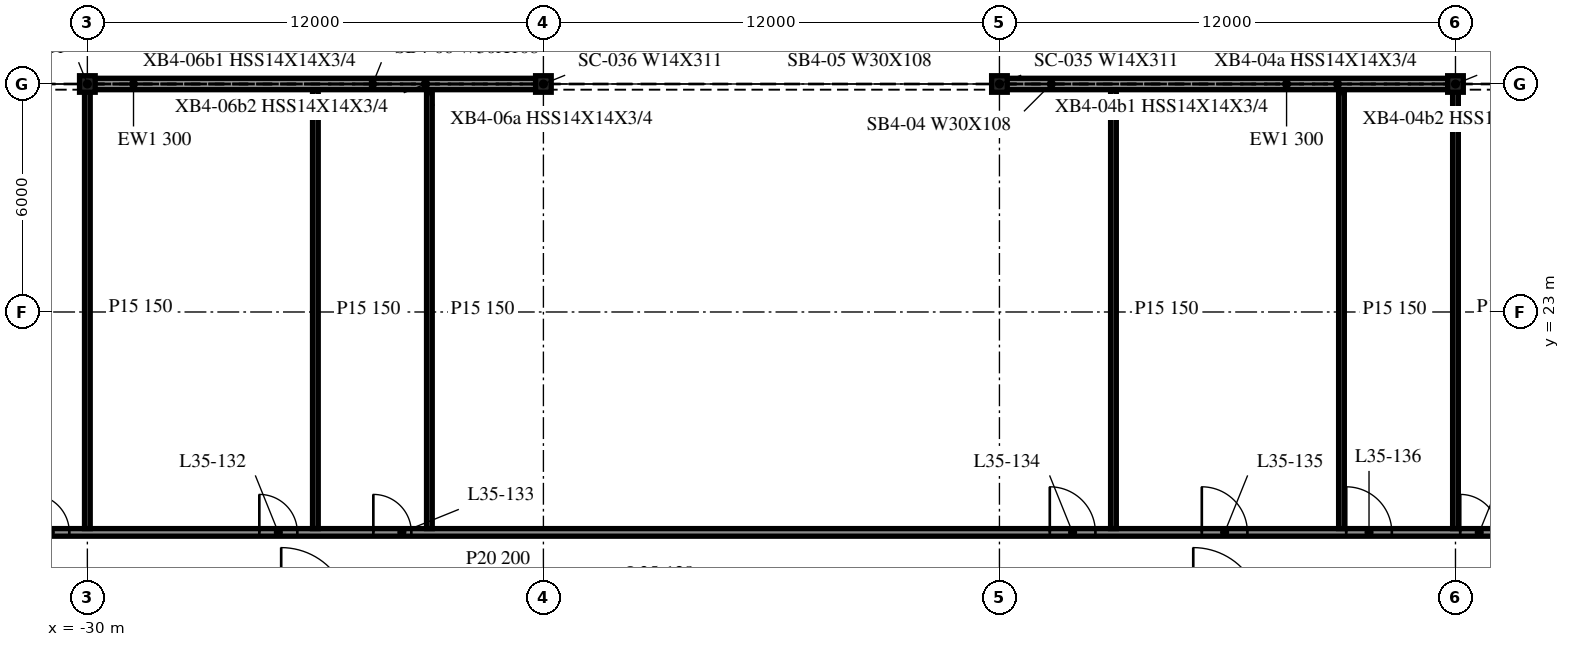
"""IFC4 building model, lengths in metres.
Left out: names, types, materials, properties, quantities, classifications, styles, units other than length and angle.
Written with IfcOpenShell. Run it as: python <this file> out.ifc"""

import sys

from ifc_helpers import new_model, si_unit, direction, frame, frame_2d, origin, origin_2d, place, context, subcontext, project, spatial, rectangle, i_section, extrude, element, fill, save


model = new_model("IFC4")
c1 = context("Model", 3, precision=1e-05, world=origin(), true_north=direction((0.0, 1.0)))
c2 = subcontext(c1, "Body", "Model", "MODEL_VIEW")
j1 = project(units=[si_unit("LENGTHUNIT", "METRE"), si_unit("PLANEANGLEUNIT", "RADIAN")], contexts=[c1])
p1 = place(None, origin())
s1 = spatial("IfcSite", under=j1, at=p1, CompositionType="ELEMENT")
p2 = place(p1, origin())
s2 = spatial("IfcBuilding", under=s1, at=p2, CompositionType="ELEMENT")
p3 = place(p2, frame((0.0, 0.0, 150.7)))
s3 = spatial("IfcBuildingStorey", under=s2, at=p3, CompositionType="ELEMENT", Elevation=150.7)
for number, where, z_axis, x_axis in (
    (1, (6.0, 29.0, -0.34), (0.0, 0.0, 1.0), (1.0, 0.0, 0.0)),
    (2, (-6.0, 29.0, -0.34), (0.0, 0.0, 1.0), (1.0, 0.0, 0.0)),
    (3, (-18.0, 29.0, -0.34), (0.0, 0.0, 1.0), (1.0, 0.0, 0.0)),
    (4, (-30.0, 29.0, -0.34), (0.0, 0.0, 1.0), (1.0, 0.0, 0.0)),
):
    element("IfcColumn", number, at=place(p3, frame(where, z_axis=z_axis, x_axis=x_axis)), inside=s3, PredefinedType="COLUMN", context=c2, shape_type="SweptSolid", body=[
        extrude(i_section(OverallWidth=0.412, OverallDepth=0.434, WebThickness=0.036, FlangeThickness=0.057, at=origin_2d()), origin(), (0.0, 0.0, 1.0), 3.89),
    ])
for number, where, z_axis, x_axis in (
    (5, (5.982, 29.0, 0.0), (0.0, 0.0, 1.0), (-1.0, 0.0, 0.0)),
    (6, (-18.018, 29.0, 0.0), (0.0, 0.0, 1.0), (-1.0, 0.0, 0.0)),
):
    element("IfcWall", number, at=place(p3, frame(where, z_axis=z_axis, x_axis=x_axis)), inside=s3, PredefinedType="NOTDEFINED", context=c2, shape_type="SweptSolid", body=[
        extrude(rectangle(XDim=11.964, YDim=0.3, at=frame_2d((5.982, 0.0))), origin(), (0.0, 0.0, 1.0), 3.55),
    ])
p4 = place(p3, frame((-47.975, 17.2, 0.0), z_axis=(0.0, 0.0, 1.0), x_axis=(1.0, 0.0, 0.0)))
e7 = element("IfcWall", 7, at=p4, inside=s3, PredefinedType="PARTITIONING", context=c2, shape_type="SweptSolid", body=[
    extrude(rectangle(XDim=95.95, YDim=0.2, at=frame_2d((47.975, 0.0))), origin(), (0.0, 0.0, 1.0), 3.55),
])
p5 = place(p4, frame((16.5, 0.0, 0.0)))
e8 = element("IfcOpeningElement", 8, at=p5, cuts=e7, PredefinedType="OPENING", context=c2, shape_type="SweptSolid", body=[
    extrude(rectangle(XDim=1.0, YDim=2.1, at=frame_2d((0.5, 1.05))), frame((0.0, 0.11, 0.0), z_axis=(0.0, -1.0, 0.0), x_axis=(1.0, 0.0, 0.0)), (0.0, 0.0, 1.0), 0.22),
])
p6 = place(p4, frame((22.5, 0.0, 0.0)))
e9 = element("IfcOpeningElement", 9, at=p6, cuts=e7, PredefinedType="OPENING", context=c2, shape_type="SweptSolid", body=[
    extrude(rectangle(XDim=1.0, YDim=2.1, at=frame_2d((0.5, 1.05))), frame((0.0, 0.11, 0.0), z_axis=(0.0, -1.0, 0.0), x_axis=(1.0, 0.0, 0.0)), (0.0, 0.0, 1.0), 0.22),
])
p7 = place(p4, frame((25.5, 0.0, 0.0)))
e10 = element("IfcOpeningElement", 10, at=p7, cuts=e7, PredefinedType="OPENING", context=c2, shape_type="SweptSolid", body=[
    extrude(rectangle(XDim=1.0, YDim=2.1, at=frame_2d((0.5, 1.05))), frame((0.0, 0.11, 0.0), z_axis=(0.0, -1.0, 0.0), x_axis=(1.0, 0.0, 0.0)), (0.0, 0.0, 1.0), 0.22),
])
p8 = place(p4, frame((43.3, 0.0, 0.0)))
e11 = element("IfcOpeningElement", 11, at=p8, cuts=e7, PredefinedType="OPENING", context=c2, shape_type="SweptSolid", body=[
    extrude(rectangle(XDim=1.2, YDim=2.1, at=frame_2d((0.6, 1.05))), frame((0.0, 0.11, 0.0), z_axis=(0.0, -1.0, 0.0), x_axis=(1.0, 0.0, 0.0)), (0.0, 0.0, 1.0), 0.22),
])
p9 = place(p4, frame((47.3, 0.0, 0.0)))
e12 = element("IfcOpeningElement", 12, at=p9, cuts=e7, PredefinedType="OPENING", context=c2, shape_type="SweptSolid", body=[
    extrude(rectangle(XDim=1.2, YDim=2.1, at=frame_2d((0.6, 1.05))), frame((0.0, 0.11, 0.0), z_axis=(0.0, -1.0, 0.0), x_axis=(1.0, 0.0, 0.0)), (0.0, 0.0, 1.0), 0.22),
])
p10 = place(p4, frame((51.1, 0.0, 0.0)))
e13 = element("IfcOpeningElement", 13, at=p10, cuts=e7, PredefinedType="OPENING", context=c2, shape_type="SweptSolid", body=[
    extrude(rectangle(XDim=1.2, YDim=2.1, at=frame_2d((0.6, 1.05))), frame((0.0, 0.11, 0.0), z_axis=(0.0, -1.0, 0.0), x_axis=(1.0, 0.0, 0.0)), (0.0, 0.0, 1.0), 0.22),
])
p11 = place(p4, frame((54.1, 0.0, 0.0)))
e14 = element("IfcOpeningElement", 14, at=p11, cuts=e7, PredefinedType="OPENING", context=c2, shape_type="SweptSolid", body=[
    extrude(rectangle(XDim=1.0, YDim=2.1, at=frame_2d((0.5, 1.05))), frame((0.0, 0.11, 0.0), z_axis=(0.0, -1.0, 0.0), x_axis=(1.0, 0.0, 0.0)), (0.0, 0.0, 1.0), 0.22),
])
p12 = place(p4, frame((72.1, 0.0, 0.0)))
e15 = element("IfcOpeningElement", 15, at=p12, cuts=e7, PredefinedType="OPENING", context=c2, shape_type="SweptSolid", body=[
    extrude(rectangle(XDim=1.0, YDim=2.1, at=frame_2d((0.5, 1.05))), frame((0.0, 0.11, 0.0), z_axis=(0.0, -1.0, 0.0), x_axis=(1.0, 0.0, 0.0)), (0.0, 0.0, 1.0), 0.22),
])
p13 = place(p4, frame((78.1, 0.0, 0.0)))
e16 = element("IfcOpeningElement", 16, at=p13, cuts=e7, PredefinedType="OPENING", context=c2, shape_type="SweptSolid", body=[
    extrude(rectangle(XDim=1.0, YDim=2.1, at=frame_2d((0.5, 1.05))), frame((0.0, 0.11, 0.0), z_axis=(0.0, -1.0, 0.0), x_axis=(1.0, 0.0, 0.0)), (0.0, 0.0, 1.0), 0.22),
])
p14 = place(p4, frame((81.1, 0.0, 0.0)))
e17 = element("IfcOpeningElement", 17, at=p14, cuts=e7, PredefinedType="OPENING", context=c2, shape_type="SweptSolid", body=[
    extrude(rectangle(XDim=1.2, YDim=2.1, at=frame_2d((0.6, 1.05))), frame((0.0, 0.11, 0.0), z_axis=(0.0, -1.0, 0.0), x_axis=(1.0, 0.0, 0.0)), (0.0, 0.0, 1.0), 0.22),
])
p15 = place(p3, frame((-30.0, 17.3, 0.0), z_axis=(0.0, 0.0, 1.0), x_axis=(0.0, 1.0, 0.0)))
e18 = element("IfcWall", 18, at=p15, inside=s3, PredefinedType="PARTITIONING", context=c2, shape_type="SweptSolid", body=[
    extrude(rectangle(XDim=11.675, YDim=0.15, at=frame_2d((5.837, 0.0))), origin(), (0.0, 0.0, 1.0), 2.551),
])
for number, where, z_axis, x_axis in (
    (19, (-24.0, 17.3, 0.0), (0.0, 0.0, 1.0), (0.0, 1.0, 0.0)),
    (20, (-21.0, 17.3, 0.0), (0.0, 0.0, 1.0), (0.0, 1.0, 0.0)),
    (21, (-3.0, 17.3, 0.0), (0.0, 0.0, 1.0), (0.0, 1.0, 0.0)),
    (22, (3.0, 17.3, 0.0), (0.0, 0.0, 1.0), (0.0, 1.0, 0.0)),
):
    element("IfcWall", number, at=place(p3, frame(where, z_axis=z_axis, x_axis=x_axis)), inside=s3, PredefinedType="PARTITIONING", context=c2, shape_type="SweptSolid", body=[
        extrude(rectangle(XDim=11.55, YDim=0.15, at=frame_2d((5.775, 0.0))), origin(), (0.0, 0.0, 1.0), 3.55),
    ])
p16 = place(p3, frame((6.0, 17.3, 0.0), z_axis=(0.0, 0.0, 1.0), x_axis=(0.0, 1.0, 0.0)))
e23 = element("IfcWall", 23, at=p16, inside=s3, PredefinedType="PARTITIONING", context=c2, shape_type="SweptSolid", body=[
    extrude(rectangle(XDim=11.675, YDim=0.15, at=frame_2d((5.837, 0.0))), origin(), (0.0, 0.0, 1.0), 2.551),
])
p17 = place(p5, origin())
e24 = element("IfcDoor", 24, at=p17, inside=s3, OperationType="SINGLE_SWING_LEFT", PredefinedType="DOOR", context=c2, shape_type="SweptSolid", body=[
    extrude(rectangle(XDim=1.0, YDim=2.1, at=frame_2d((0.5, 1.05))), frame((0.0, 0.025, 0.0), z_axis=(0.0, -1.0, 0.0), x_axis=(1.0, 0.0, 0.0)), (0.0, 0.0, 1.0), 0.05),
])
fill(e8, e24)
p18 = place(p6, origin())
e25 = element("IfcDoor", 25, at=p18, inside=s3, OperationType="SINGLE_SWING_LEFT", PredefinedType="DOOR", context=c2, shape_type="SweptSolid", body=[
    extrude(rectangle(XDim=1.0, YDim=2.1, at=frame_2d((0.5, 1.05))), frame((0.0, 0.025, 0.0), z_axis=(0.0, -1.0, 0.0), x_axis=(1.0, 0.0, 0.0)), (0.0, 0.0, 1.0), 0.05),
])
fill(e9, e25)
p19 = place(p7, origin())
e26 = element("IfcDoor", 26, at=p19, inside=s3, OperationType="SINGLE_SWING_LEFT", PredefinedType="DOOR", context=c2, shape_type="SweptSolid", body=[
    extrude(rectangle(XDim=1.0, YDim=2.1, at=frame_2d((0.5, 1.05))), frame((0.0, 0.025, 0.0), z_axis=(0.0, -1.0, 0.0), x_axis=(1.0, 0.0, 0.0)), (0.0, 0.0, 1.0), 0.05),
])
fill(e10, e26)
p20 = place(p8, origin())
e27 = element("IfcDoor", 27, at=p20, inside=s3, OperationType="SINGLE_SWING_LEFT", PredefinedType="DOOR", context=c2, shape_type="SweptSolid", body=[
    extrude(rectangle(XDim=1.2, YDim=2.1, at=frame_2d((0.6, 1.05))), frame((0.0, 0.025, 0.0), z_axis=(0.0, -1.0, 0.0), x_axis=(1.0, 0.0, 0.0)), (0.0, 0.0, 1.0), 0.05),
])
fill(e11, e27)
p21 = place(p9, origin())
e28 = element("IfcDoor", 28, at=p21, inside=s3, OperationType="SINGLE_SWING_RIGHT", PredefinedType="DOOR", context=c2, shape_type="SweptSolid", body=[
    extrude(rectangle(XDim=1.2, YDim=2.1, at=frame_2d((0.6, 1.05))), frame((0.0, 0.025, 0.0), z_axis=(0.0, -1.0, 0.0), x_axis=(1.0, 0.0, 0.0)), (0.0, 0.0, 1.0), 0.05),
])
fill(e12, e28)
p22 = place(p10, origin())
e29 = element("IfcDoor", 29, at=p22, inside=s3, OperationType="SINGLE_SWING_RIGHT", PredefinedType="DOOR", context=c2, shape_type="SweptSolid", body=[
    extrude(rectangle(XDim=1.2, YDim=2.1, at=frame_2d((0.6, 1.05))), frame((0.0, 0.025, 0.0), z_axis=(0.0, -1.0, 0.0), x_axis=(1.0, 0.0, 0.0)), (0.0, 0.0, 1.0), 0.05),
])
fill(e13, e29)
p23 = place(p11, origin())
e30 = element("IfcDoor", 30, at=p23, inside=s3, OperationType="SINGLE_SWING_RIGHT", PredefinedType="DOOR", context=c2, shape_type="SweptSolid", body=[
    extrude(rectangle(XDim=1.0, YDim=2.1, at=frame_2d((0.5, 1.05))), frame((0.0, 0.025, 0.0), z_axis=(0.0, -1.0, 0.0), x_axis=(1.0, 0.0, 0.0)), (0.0, 0.0, 1.0), 0.05),
])
fill(e14, e30)
save(model, sys.argv[1])
